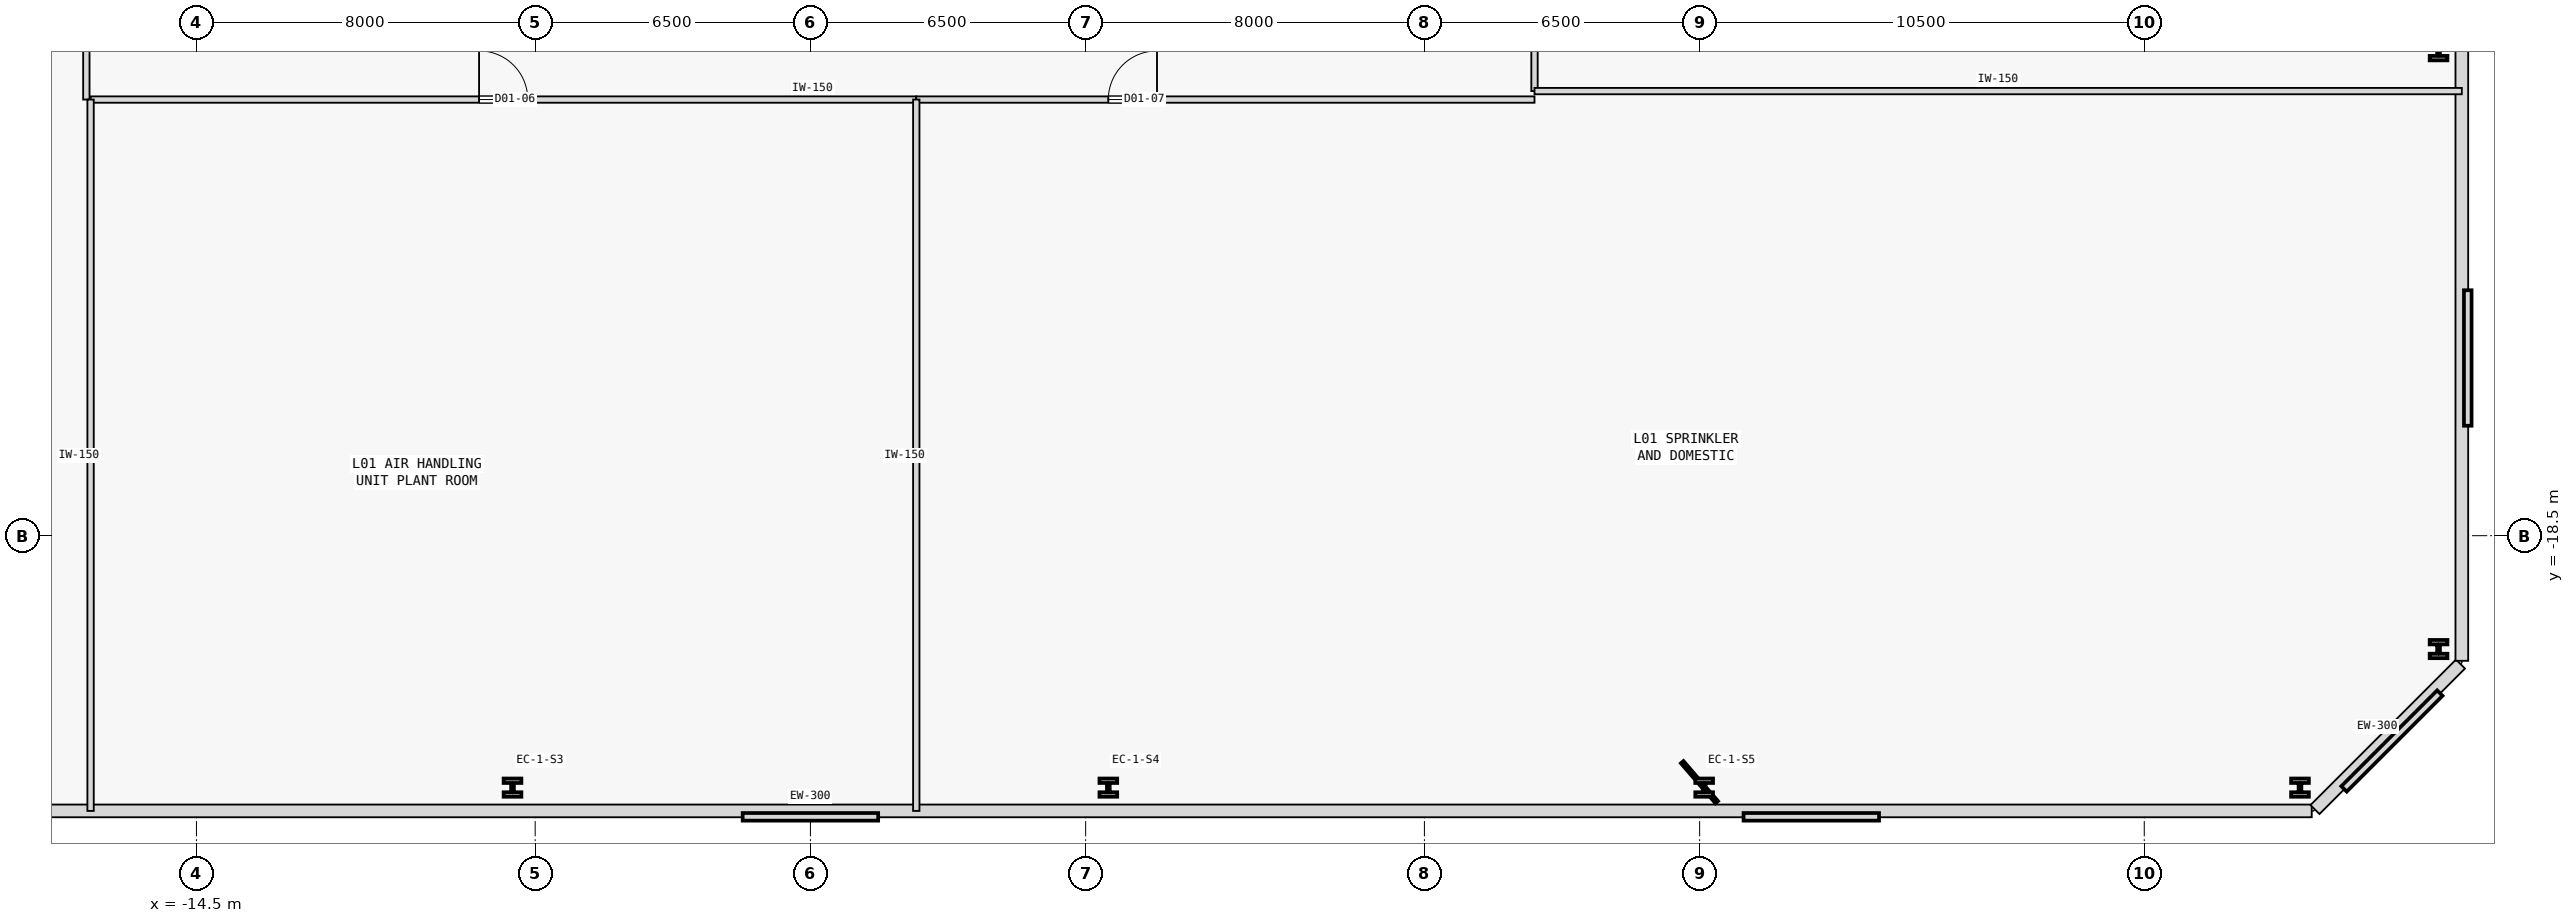
"""IFC4 building model, lengths in metres.
Left out: names, types, materials, properties, quantities, classifications, styles, units other than length and angle.
Written with IfcOpenShell. Run it as: python <this file> out.ifc"""

import sys

from ifc_helpers import new_model, si_unit, direction, frame, frame_2d, origin, origin_2d, place, context, subcontext, project, spatial, rectangle, i_section, extrude, element, fill, save


model = new_model("IFC4")
c1 = context("Model", 3, precision=1e-05, world=origin(), true_north=direction((0.0, 1.0)))
c2 = subcontext(c1, "Body", "Model", "MODEL_VIEW")
j1 = project(units=[si_unit("LENGTHUNIT", "METRE"), si_unit("PLANEANGLEUNIT", "RADIAN")], contexts=[c1])
p1 = place(None, origin())
s1 = spatial("IfcSite", under=j1, at=p1, CompositionType="ELEMENT")
p2 = place(p1, origin())
s2 = spatial("IfcBuilding", under=s1, at=p2, CompositionType="ELEMENT")
p3 = place(p2, frame((0.0, 0.0, 9.6)))
s3 = spatial("IfcBuildingStorey", under=s2, at=p3, CompositionType="ELEMENT", Elevation=9.6)
for number, where, z_axis, x_axis in (
    (1, (-7.036, -24.45, 0.0), (0.0, 0.0, 1.0), (1.0, 0.0, 0.0)),
    (2, (7.036, -24.45, 0.0), (0.0, 0.0, 1.0), (1.0, 0.0, 0.0)),
    (3, (21.107, -24.45, 0.0), (0.0, 0.0, 1.0), (1.0, 0.0, 0.0)),
    (4, (35.178, -24.45, 0.0), (0.0, 0.0, 1.0), (1.0, 0.0, 0.0)),
    (5, (38.45, -21.178, 0.0), (0.0, 0.0, 1.0), (1.0, 0.0, 0.0)),
    (6, (38.45, -7.059, 0.0), (0.0, 0.0, 1.0), (1.0, 0.0, 0.0)),
):
    element("IfcColumn", number, at=place(p3, frame(where, z_axis=z_axis, x_axis=x_axis)), inside=s3, PredefinedType="COLUMN", context=c2, shape_type="SweptSolid", body=[
        extrude(i_section(OverallWidth=0.42, OverallDepth=0.431, WebThickness=0.065, FlangeThickness=0.106, FilletRadius=0.015, at=origin_2d()), origin(), (0.0, 0.0, 1.0), 4.6),
    ])
p4 = place(p3, frame((-35.455, -25.0, 0.0), z_axis=(0.0, 0.0, 1.0), x_axis=(1.0, 0.0, 0.0)))
e7 = element("IfcWall", 7, at=p4, inside=s3, PredefinedType="STANDARD", context=c2, shape_type="SweptSolid", body=[
    extrude(rectangle(XDim=70.91, YDim=0.3, at=frame_2d((35.455, 0.0))), origin(), (0.0, 0.0, 1.0), 4.375),
])
p5 = place(p3, frame((35.532, -24.968, 0.0), z_axis=(0.0, 0.0, 1.0), x_axis=(0.707106781187, 0.707106781187, 0.0)))
e8 = element("IfcWall", 8, at=p5, inside=s3, PredefinedType="STANDARD", context=c2, shape_type="SweptSolid", body=[
    extrude(rectangle(XDim=4.86, YDim=0.3, at=frame_2d((2.43, 0.0))), origin(), (0.0, 0.0, 1.0), 4.375),
])
p6 = place(p3, frame((39.0, -21.455, 0.0), z_axis=(0.0, 0.0, 1.0), x_axis=(0.0, 1.0, 0.0)))
e9 = element("IfcWall", 9, at=p6, inside=s3, PredefinedType="STANDARD", context=c2, shape_type="SweptSolid", body=[
    extrude(rectangle(XDim=42.91, YDim=0.3, at=frame_2d((21.455, 0.0))), origin(), (0.0, 0.0, 1.0), 4.375),
])
p7 = place(p3, frame((-17.0, -8.2, 0.0), z_axis=(0.0, 0.0, 1.0), x_axis=(1.0, 0.0, 0.0)))
e10 = element("IfcWall", 10, at=p7, inside=s3, PredefinedType="PARTITIONING", context=c2, shape_type="SweptSolid", body=[
    extrude(rectangle(XDim=19.5, YDim=0.15, at=frame_2d((9.75, 0.0))), origin(), (0.0, 0.0, 1.0), 4.375),
])
p8 = place(p7, frame((9.175, 0.0, 0.0)))
e11 = element("IfcOpeningElement", 11, at=p8, cuts=e10, PredefinedType="OPENING", context=c2, shape_type="SweptSolid", body=[
    extrude(rectangle(XDim=1.15, YDim=2.15, at=frame_2d((0.575, 1.075))), frame((0.0, 0.085, 0.0), z_axis=(0.0, -1.0, 0.0), x_axis=(1.0, 0.0, 0.0)), (0.0, 0.0, 1.0), 0.17),
])
p9 = place(p3, frame((2.5, -8.2, 0.0), z_axis=(0.0, 0.0, 1.0), x_axis=(1.0, 0.0, 0.0)))
e12 = element("IfcWall", 12, at=p9, inside=s3, PredefinedType="PARTITIONING", context=c2, shape_type="SweptSolid", body=[
    extrude(rectangle(XDim=14.6, YDim=0.15, at=frame_2d((7.3, 0.0))), origin(), (0.0, 0.0, 1.0), 4.375),
])
p10 = place(p9, frame((4.535, 0.0, 0.0)))
e13 = element("IfcOpeningElement", 13, at=p10, cuts=e12, PredefinedType="OPENING", context=c2, shape_type="SweptSolid", body=[
    extrude(rectangle(XDim=1.15, YDim=2.15, at=frame_2d((0.575, 1.075))), frame((0.0, 0.085, 0.0), z_axis=(0.0, -1.0, 0.0), x_axis=(1.0, 0.0, 0.0)), (0.0, 0.0, 1.0), 0.17),
])
p11 = place(p3, frame((-17.1, -8.2, 0.0), z_axis=(0.0, 0.0, 1.0), x_axis=(0.0, 1.0, 0.0)))
e14 = element("IfcWall", 14, at=p11, inside=s3, PredefinedType="PARTITIONING", context=c2, shape_type="SweptSolid", body=[
    extrude(rectangle(XDim=16.4, YDim=0.15, at=frame_2d((8.2, 0.0))), origin(), (0.0, 0.0, 1.0), 4.375),
])
p12 = place(p11, frame((5.165, 0.0, 0.0)))
e15 = element("IfcOpeningElement", 15, at=p12, cuts=e14, PredefinedType="OPENING", context=c2, shape_type="SweptSolid", body=[
    extrude(rectangle(XDim=1.15, YDim=2.15, at=frame_2d((0.575, 1.075))), frame((0.0, 0.085, 0.0), z_axis=(0.0, -1.0, 0.0), x_axis=(1.0, 0.0, 0.0)), (0.0, 0.0, 1.0), 0.17),
])
p13 = place(p3, frame((17.1, -8.0, 0.0), z_axis=(0.0, 0.0, 1.0), x_axis=(0.0, 1.0, 0.0)))
e16 = element("IfcWall", 16, at=p13, inside=s3, PredefinedType="PARTITIONING", context=c2, shape_type="SweptSolid", body=[
    extrude(rectangle(XDim=16.0, YDim=0.15, at=frame_2d((8.0, 0.0))), origin(), (0.0, 0.0, 1.0), 4.375),
])
p14 = place(p13, frame((5.025, 0.0, 0.0)))
e17 = element("IfcOpeningElement", 17, at=p14, cuts=e16, PredefinedType="OPENING", context=c2, shape_type="SweptSolid", body=[
    extrude(rectangle(XDim=1.15, YDim=2.15, at=frame_2d((0.575, 1.075))), frame((0.0, 0.085, 0.0), z_axis=(0.0, -1.0, 0.0), x_axis=(1.0, 0.0, 0.0)), (0.0, 0.0, 1.0), 0.17),
])
for number, where, z_axis, x_axis in (
    (18, (2.5, -25.0, 0.0), (0.0, 0.0, 1.0), (0.0, 1.0, 0.0)),
    (19, (-17.0, -25.0, 0.0), (0.0, 0.0, 1.0), (0.0, 1.0, 0.0)),
):
    element("IfcWall", number, at=place(p3, frame(where, z_axis=z_axis, x_axis=x_axis)), inside=s3, PredefinedType="PARTITIONING", context=c2, shape_type="SweptSolid", body=[
        extrude(rectangle(XDim=16.8, YDim=0.15, at=frame_2d((8.4, 0.0))), origin(), (0.0, 0.0, 1.0), 4.375),
    ])
p15 = place(p3, frame((17.1, -8.0, 0.0), z_axis=(0.0, 0.0, 1.0), x_axis=(1.0, 0.0, 0.0)))
e20 = element("IfcWall", 20, at=p15, inside=s3, PredefinedType="PARTITIONING", context=c2, shape_type="SweptSolid", body=[
    extrude(rectangle(XDim=21.9, YDim=0.15, at=frame_2d((10.95, 0.0))), origin(), (0.0, 0.0, 1.0), 4.375),
])
p16 = place(p8, origin())
e21 = element("IfcDoor", 21, at=p16, inside=s3, OperationType="SINGLE_SWING_LEFT", PredefinedType="DOOR", context=c2, shape_type="SweptSolid", body=[
    extrude(rectangle(XDim=1.15, YDim=2.15, at=frame_2d((0.575, 1.075))), frame((0.0, 0.025, 0.0), z_axis=(0.0, -1.0, 0.0), x_axis=(1.0, 0.0, 0.0)), (0.0, 0.0, 1.0), 0.05),
])
fill(e11, e21)
p17 = place(p10, origin())
e22 = element("IfcDoor", 22, at=p17, inside=s3, OperationType="SINGLE_SWING_RIGHT", PredefinedType="DOOR", context=c2, shape_type="SweptSolid", body=[
    extrude(rectangle(XDim=1.15, YDim=2.15, at=frame_2d((0.575, 1.075))), frame((0.0, 0.025, 0.0), z_axis=(0.0, -1.0, 0.0), x_axis=(1.0, 0.0, 0.0)), (0.0, 0.0, 1.0), 0.05),
])
fill(e13, e22)
save(model, sys.argv[1])
